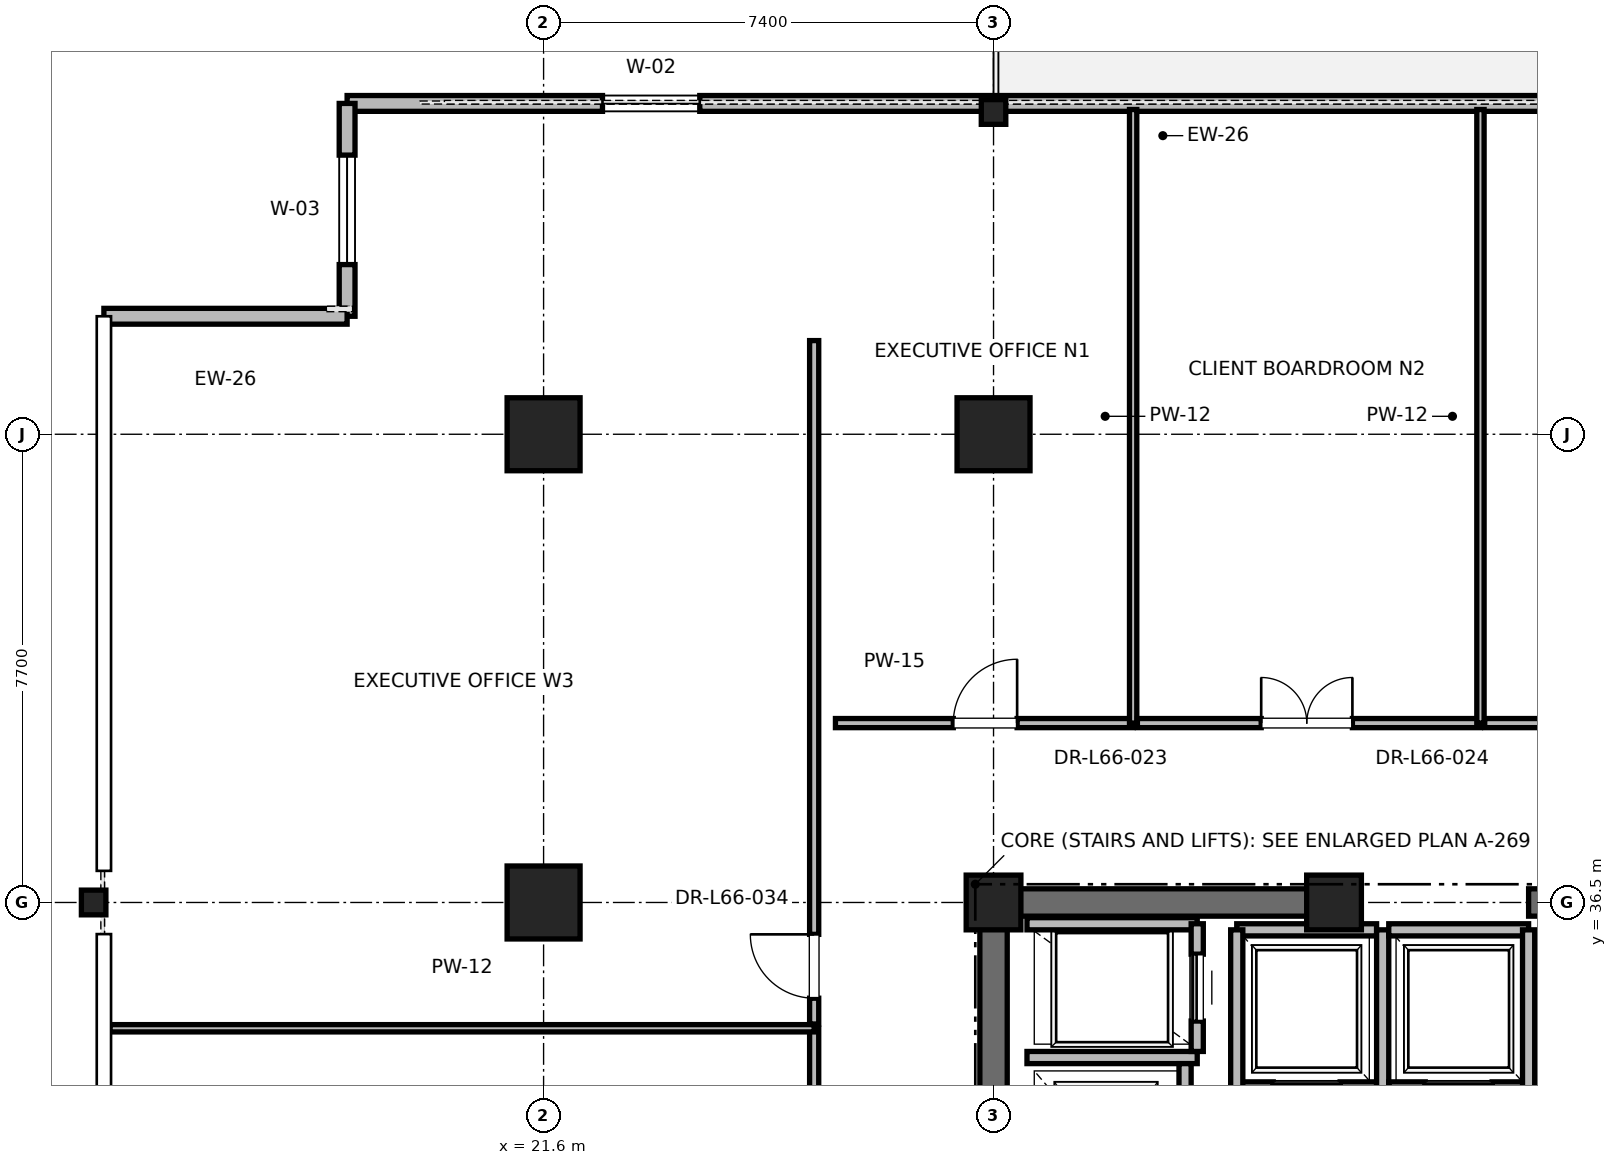
"""IFC4 building model, lengths in metres.
Left out: names, types, materials, properties, quantities, classifications, styles, units other than length and angle.
Written with IfcOpenShell. Run it as: python <this file> out.ifc"""

import sys

from ifc_helpers import new_model, si_unit, direction, frame, frame_2d, origin, origin_2d, place, context, subcontext, project, spatial, rectangle, i_section, extrude, element, fill, save


model = new_model("IFC4")
c1 = context("Model", 3, precision=1e-05, world=origin(), true_north=direction((0.0, 1.0)))
c2 = subcontext(c1, "Body", "Model", "MODEL_VIEW")
j1 = project(units=[si_unit("LENGTHUNIT", "METRE"), si_unit("PLANEANGLEUNIT", "RADIAN")], contexts=[c1])
p1 = place(None, origin())
s1 = spatial("IfcSite", under=j1, at=p1, CompositionType="ELEMENT")
p2 = place(p1, origin())
s2 = spatial("IfcBuilding", under=s1, at=p2, CompositionType="ELEMENT")
p3 = place(p2, frame((0.0, 0.0, 283.2)))
s3 = spatial("IfcBuildingStorey", under=s2, at=p3, CompositionType="ELEMENT", Elevation=283.2)
for number, where, z_axis, x_axis in (
    (1, (29.0, 44.2, 0.0), (0.0, 0.0, 1.0), (1.0, 0.0, 0.0)),
    (2, (21.6, 36.5, 0.0), (0.0, 0.0, 1.0), (1.0, 0.0, 0.0)),
    (3, (21.6, 44.2, 0.0), (0.0, 0.0, 1.0), (1.0, 0.0, 0.0)),
):
    element("IfcColumn", number, at=place(p3, frame(where, z_axis=z_axis, x_axis=x_axis)), inside=s3, PredefinedType="COLUMN", context=c2, shape_type="SweptSolid", body=[
        extrude(rectangle(XDim=1.2, YDim=1.2, at=origin_2d()), origin(), (0.0, 0.0, 1.0), 4.0),
    ])
for number, where, z_axis, x_axis in (
    (4, (14.2, 36.5, 0.0), (0.0, 0.0, 1.0), (1.0, 0.0, 0.0)),
    (5, (29.0, 49.5, 0.0), (0.0, 0.0, 1.0), (1.0, 0.0, 0.0)),
):
    element("IfcColumn", number, at=place(p3, frame(where, z_axis=z_axis, x_axis=x_axis)), inside=s3, PredefinedType="COLUMN", context=c2, shape_type="SweptSolid", body=[
        extrude(i_section(OverallWidth=0.403, OverallDepth=0.406, WebThickness=0.027, FlangeThickness=0.043, FilletRadius=0.015, at=origin_2d()), origin(), (0.0, 0.0, 1.0), 4.0),
    ])
for number, where, z_axis, x_axis in (
    (6, (29.0, 36.5, 0.0), (0.0, 0.0, 1.0), (1.0, 0.0, 0.0)),
    (7, (34.6, 36.5, 0.0), (0.0, 0.0, 1.0), (1.0, 0.0, 0.0)),
):
    element("IfcColumn", number, at=place(p3, frame(where, z_axis=z_axis, x_axis=x_axis)), inside=s3, PredefinedType="PILASTER", context=c2, shape_type="SweptSolid", body=[
        extrude(rectangle(XDim=0.9, YDim=0.9, at=origin_2d()), origin(), (0.0, 0.0, 1.0), 4.0),
    ])
p4 = place(p3, frame((29.0, 36.5, 0.0), z_axis=(0.0, 0.0, 1.0), x_axis=(1.0, 0.0, 0.0)))
e8 = element("IfcWall", 8, at=p4, inside=s3, PredefinedType="SHEAR", context=c2, shape_type="SweptSolid", body=[
    extrude(rectangle(XDim=5.8, YDim=0.45, at=frame_2d((2.9, 0.0))), origin(), (0.0, 0.0, 1.0), 3.785),
])
p5 = place(p3, frame((37.8, 36.5, 0.0), z_axis=(0.0, 0.0, 1.0), x_axis=(1.0, 0.0, 0.0)))
e9 = element("IfcWall", 9, at=p5, inside=s3, PredefinedType="SHEAR", context=c2, shape_type="SweptSolid", body=[
    extrude(rectangle(XDim=4.4, YDim=0.45, at=frame_2d((2.2, 0.0))), origin(), (0.0, 0.0, 1.0), 3.785),
])
p6 = place(p5, frame((1.65, 0.0, 0.0)))
e10 = element("IfcOpeningElement", 10, at=p6, cuts=e9, PredefinedType="OPENING", context=c2, shape_type="SweptSolid", body=[
    extrude(rectangle(XDim=1.1, YDim=2.15, at=frame_2d((0.55, 1.075))), frame((0.0, 0.225, 0.0), z_axis=(0.0, -1.0, 0.0), x_axis=(1.0, 0.0, 0.0)), (0.0, 0.0, 1.0), 0.45),
])
p7 = place(p3, frame((29.0, 30.7, 0.0), z_axis=(0.0, 0.0, 1.0), x_axis=(0.0, 1.0, 0.0)))
e11 = element("IfcWall", 11, at=p7, inside=s3, PredefinedType="SHEAR", context=c2, shape_type="SweptSolid", body=[
    extrude(rectangle(XDim=5.8, YDim=0.45, at=frame_2d((2.9, 0.0))), origin(), (0.0, 0.0, 1.0), 3.785),
])
p8 = place(p3, frame((61.631, 49.64, 0.0), z_axis=(0.0, 0.0, 1.0), x_axis=(-1.0, 0.0, 0.0)))
e12 = element("IfcWall", 12, at=p8, inside=s3, PredefinedType="PARAPET", context=c2, shape_type="SweptSolid", body=[
    extrude(rectangle(XDim=43.263, YDim=0.26, at=frame_2d((21.631, 0.0))), origin(), (0.0, 0.0, 1.0), 3.123),
])
p9 = place(p8, frame((4.2, 0.0, 0.85)))
e13 = element("IfcOpeningElement", 13, at=p9, cuts=e12, PredefinedType="OPENING", context=c2, shape_type="SweptSolid", body=[
    extrude(rectangle(XDim=1.6, YDim=2.1, at=frame_2d((0.8, 1.05))), frame((0.0, 0.13, 0.0), z_axis=(0.0, -1.0, 0.0), x_axis=(1.0, 0.0, 0.0)), (0.0, 0.0, 1.0), 0.26),
])
p10 = place(p8, frame((21.031, 0.0, 0.0)))
e14 = element("IfcOpeningElement", 14, at=p10, cuts=e12, PredefinedType="OPENING", context=c2, shape_type="SweptSolid", body=[
    extrude(rectangle(XDim=1.2, YDim=2.2, at=frame_2d((0.6, 1.1))), frame((0.0, 0.13, 0.0), z_axis=(0.0, -1.0, 0.0), x_axis=(1.0, 0.0, 0.0)), (0.0, 0.0, 1.0), 0.26),
])
p11 = place(p8, frame((37.463, 0.0, 0.85)))
e15 = element("IfcOpeningElement", 15, at=p11, cuts=e12, PredefinedType="OPENING", context=c2, shape_type="SweptSolid", body=[
    extrude(rectangle(XDim=1.6, YDim=2.1, at=frame_2d((0.8, 1.05))), frame((0.0, 0.13, 0.0), z_axis=(0.0, -1.0, 0.0), x_axis=(1.0, 0.0, 0.0)), (0.0, 0.0, 1.0), 0.26),
])
p12 = place(p3, frame((18.369, 49.64, 0.0), z_axis=(0.0, 0.0, 1.0), x_axis=(0.0, -1.0, 0.0)))
e16 = element("IfcWall", 16, at=p12, inside=s3, PredefinedType="PARAPET", context=c2, shape_type="SweptSolid", body=[
    extrude(rectangle(XDim=3.5, YDim=0.26, at=frame_2d((1.75, 0.0))), origin(), (0.0, 0.0, 1.0), 3.785),
])
p13 = place(p12, frame((0.85, 0.0, 0.85)))
e17 = element("IfcOpeningElement", 17, at=p13, cuts=e16, PredefinedType="OPENING", context=c2, shape_type="SweptSolid", body=[
    extrude(rectangle(XDim=1.8, YDim=2.2, at=frame_2d((0.9, 1.1))), frame((0.0, 0.13, 0.0), z_axis=(0.0, -1.0, 0.0), x_axis=(1.0, 0.0, 0.0)), (0.0, 0.0, 1.0), 0.26),
])
p14 = place(p3, frame((18.369, 46.14, 0.0), z_axis=(0.0, 0.0, 1.0), x_axis=(-1.0, 0.0, 0.0)))
e18 = element("IfcWall", 18, at=p14, inside=s3, PredefinedType="PARAPET", context=c2, shape_type="SweptSolid", body=[
    extrude(rectangle(XDim=4.0, YDim=0.26, at=frame_2d((2.0, 0.0))), origin(), (0.0, 0.0, 1.0), 3.785),
])
p15 = place(p3, frame((29.55, 33.95, 0.0), z_axis=(0.0, 0.0, 1.0), x_axis=(1.0, 0.0, 0.0)))
e19 = element("IfcWall", 19, at=p15, inside=s3, PredefinedType="SOLIDWALL", context=c2, shape_type="SweptSolid", body=[
    extrude(rectangle(XDim=2.8, YDim=0.2, at=frame_2d((1.4, 0.0))), origin(), (0.0, 0.0, 1.0), 3.785),
])
p16 = place(p3, frame((32.15, 30.85, 0.0), z_axis=(0.0, 0.0, 1.0), x_axis=(0.0, 1.0, 0.0)))
e20 = element("IfcWall", 20, at=p16, inside=s3, PredefinedType="SOLIDWALL", context=c2, shape_type="SweptSolid", body=[
    extrude(rectangle(XDim=3.0, YDim=0.2, at=frame_2d((1.5, 0.0))), origin(), (0.0, 0.0, 1.0), 3.785),
])
p17 = place(p3, frame((32.35, 36.15, 0.0), z_axis=(0.0, 0.0, 1.0), x_axis=(-1.0, 0.0, 0.0)))
e21 = element("IfcWall", 21, at=p17, inside=s3, PredefinedType="SOLIDWALL", context=c2, shape_type="SweptSolid", body=[
    extrude(rectangle(XDim=2.8, YDim=0.2, at=frame_2d((1.4, 0.0))), origin(), (0.0, 0.0, 1.0), 3.148),
])
p18 = place(p3, frame((32.35, 34.05, 0.0), z_axis=(0.0, 0.0, 1.0), x_axis=(0.0, 1.0, 0.0)))
e22 = element("IfcWall", 22, at=p18, inside=s3, PredefinedType="SOLIDWALL", context=c2, shape_type="SweptSolid", body=[
    extrude(rectangle(XDim=2.1, YDim=0.2, at=frame_2d((1.05, 0.0))), origin(), (0.0, 0.0, 1.0), 3.785),
])
p19 = place(p18, frame((0.5, 0.0, 0.0)))
e23 = element("IfcOpeningElement", 23, at=p19, cuts=e22, PredefinedType="OPENING", context=c2, shape_type="SweptSolid", body=[
    extrude(rectangle(XDim=1.1, YDim=2.2, at=frame_2d((0.55, 1.1))), frame((0.0, 0.1, 0.0), z_axis=(0.0, -1.0, 0.0), x_axis=(1.0, 0.0, 0.0)), (0.0, 0.0, 1.0), 0.2),
])
p20 = place(p3, frame((33.0, 33.45, 0.0), z_axis=(0.0, 0.0, 1.0), x_axis=(1.0, 0.0, 0.0)))
e24 = element("IfcWall", 24, at=p20, inside=s3, PredefinedType="SOLIDWALL", context=c2, shape_type="SweptSolid", body=[
    extrude(rectangle(XDim=2.3, YDim=0.2, at=frame_2d((1.15, 0.0))), origin(), (0.0, 0.0, 1.0), 3.785),
])
p21 = place(p20, frame((0.6, 0.0, 0.0)))
e25 = element("IfcOpeningElement", 25, at=p21, cuts=e24, PredefinedType="OPENING", context=c2, shape_type="SweptSolid", body=[
    extrude(rectangle(XDim=1.1, YDim=2.2, at=frame_2d((0.55, 1.1))), frame((0.0, 0.1, 0.0), z_axis=(0.0, -1.0, 0.0), x_axis=(1.0, 0.0, 0.0)), (0.0, 0.0, 1.0), 0.2),
])
p22 = place(p3, frame((35.3, 36.05, 0.0), z_axis=(0.0, 0.0, 1.0), x_axis=(-1.0, 0.0, 0.0)))
e26 = element("IfcWall", 26, at=p22, inside=s3, PredefinedType="SOLIDWALL", context=c2, shape_type="SweptSolid", body=[
    extrude(rectangle(XDim=2.3, YDim=0.2, at=frame_2d((1.15, 0.0))), origin(), (0.0, 0.0, 1.0), 2.865),
])
p23 = place(p3, frame((33.0, 36.05, 0.0), z_axis=(0.0, 0.0, 1.0), x_axis=(0.0, -1.0, 0.0)))
e27 = element("IfcWall", 27, at=p23, inside=s3, PredefinedType="SOLIDWALL", context=c2, shape_type="SweptSolid", body=[
    extrude(rectangle(XDim=2.6, YDim=0.2, at=frame_2d((1.3, 0.0))), origin(), (0.0, 0.0, 1.0), 3.785),
])
p24 = place(p3, frame((35.4, 33.45, 0.0), z_axis=(0.0, 0.0, 1.0), x_axis=(0.0, 1.0, 0.0)))
e28 = element("IfcWall", 28, at=p24, inside=s3, PredefinedType="SOLIDWALL", context=c2, shape_type="SweptSolid", body=[
    extrude(rectangle(XDim=2.6, YDim=0.2, at=frame_2d((1.3, 0.0))), origin(), (0.0, 0.0, 1.0), 2.865),
])
p25 = place(p3, frame((35.5, 33.45, 0.0), z_axis=(0.0, 0.0, 1.0), x_axis=(1.0, 0.0, 0.0)))
e29 = element("IfcWall", 29, at=p25, inside=s3, PredefinedType="SOLIDWALL", context=c2, shape_type="SweptSolid", body=[
    extrude(rectangle(XDim=2.3, YDim=0.2, at=frame_2d((1.15, 0.0))), origin(), (0.0, 0.0, 1.0), 3.785),
])
p26 = place(p25, frame((0.6, 0.0, 0.0)))
e30 = element("IfcOpeningElement", 30, at=p26, cuts=e29, PredefinedType="OPENING", context=c2, shape_type="SweptSolid", body=[
    extrude(rectangle(XDim=1.1, YDim=2.2, at=frame_2d((0.55, 1.1))), frame((0.0, 0.1, 0.0), z_axis=(0.0, -1.0, 0.0), x_axis=(1.0, 0.0, 0.0)), (0.0, 0.0, 1.0), 0.2),
])
p27 = place(p3, frame((37.8, 36.05, 0.0), z_axis=(0.0, 0.0, 1.0), x_axis=(-1.0, 0.0, 0.0)))
e31 = element("IfcWall", 31, at=p27, inside=s3, PredefinedType="SOLIDWALL", context=c2, shape_type="SweptSolid", body=[
    extrude(rectangle(XDim=2.3, YDim=0.2, at=frame_2d((1.15, 0.0))), origin(), (0.0, 0.0, 1.0), 2.865),
])
p28 = place(p3, frame((37.8, 33.45, 0.0), z_axis=(0.0, 0.0, 1.0), x_axis=(0.0, 1.0, 0.0)))
e32 = element("IfcWall", 32, at=p28, inside=s3, PredefinedType="SOLIDWALL", context=c2, shape_type="SweptSolid", body=[
    extrude(rectangle(XDim=2.6, YDim=0.2, at=frame_2d((1.3, 0.0))), origin(), (0.0, 0.0, 1.0), 2.865),
])
p29 = place(p3, frame((26.4, 39.45, 0.0), z_axis=(0.0, 0.0, 1.0), x_axis=(1.0, 0.0, 0.0)))
e33 = element("IfcWall", 33, at=p29, inside=s3, PredefinedType="PARTITIONING", context=c2, shape_type="SweptSolid", body=[
    extrude(rectangle(XDim=4.896, YDim=0.15, at=frame_2d((2.448, 0.0))), origin(), (0.0, 0.0, 1.0), 2.85),
])
p30 = place(p29, frame((1.938, 0.0, 0.0)))
e34 = element("IfcOpeningElement", 34, at=p30, cuts=e33, PredefinedType="OPENING", context=c2, shape_type="SweptSolid", body=[
    extrude(rectangle(XDim=1.05, YDim=2.2, at=frame_2d((0.525, 1.1))), frame((0.0, 0.075, 0.0), z_axis=(0.0, -1.0, 0.0), x_axis=(1.0, 0.0, 0.0)), (0.0, 0.0, 1.0), 0.15),
])
p31 = place(p3, frame((31.296, 39.45, 0.0), z_axis=(0.0, 0.0, 1.0), x_axis=(0.0, 1.0, 0.0)))
e35 = element("IfcWall", 35, at=p31, inside=s3, PredefinedType="PARTITIONING", context=c2, shape_type="SweptSolid", body=[
    extrude(rectangle(XDim=10.09, YDim=0.12, at=frame_2d((5.045, 0.0))), origin(), (0.0, 0.0, 1.0), 2.415),
])
p32 = place(p3, frame((31.366, 39.45, 0.0), z_axis=(0.0, 0.0, 1.0), x_axis=(1.0, 0.0, 0.0)))
e36 = element("IfcWall", 36, at=p32, inside=s3, PredefinedType="PARTITIONING", context=c2, shape_type="SweptSolid", body=[
    extrude(rectangle(XDim=5.642, YDim=0.15, at=frame_2d((2.821, 0.0))), origin(), (0.0, 0.0, 1.0), 2.85),
])
p33 = place(p32, frame((2.036, 0.0, 0.0)))
e37 = element("IfcOpeningElement", 37, at=p33, cuts=e36, PredefinedType="OPENING", context=c2, shape_type="SweptSolid", body=[
    extrude(rectangle(XDim=1.5, YDim=2.25, at=frame_2d((0.75, 1.125))), frame((0.0, 0.075, 0.0), z_axis=(0.0, -1.0, 0.0), x_axis=(1.0, 0.0, 0.0)), (0.0, 0.0, 1.0), 0.15),
])
p34 = place(p3, frame((37.008, 39.45, 0.0), z_axis=(0.0, 0.0, 1.0), x_axis=(0.0, 1.0, 0.0)))
e38 = element("IfcWall", 38, at=p34, inside=s3, PredefinedType="PARTITIONING", context=c2, shape_type="SweptSolid", body=[
    extrude(rectangle(XDim=10.09, YDim=0.12, at=frame_2d((5.045, 0.0))), origin(), (0.0, 0.0, 1.0), 2.415),
])
p35 = place(p3, frame((37.078, 39.45, 0.0), z_axis=(0.0, 0.0, 1.0), x_axis=(1.0, 0.0, 0.0)))
e39 = element("IfcWall", 39, at=p35, inside=s3, PredefinedType="PARTITIONING", context=c2, shape_type="SweptSolid", body=[
    extrude(rectangle(XDim=6.186, YDim=0.15, at=frame_2d((3.093, 0.0))), origin(), (0.0, 0.0, 1.0), 2.85),
])
p36 = place(p35, frame((2.558, 0.0, 0.0)))
e40 = element("IfcOpeningElement", 40, at=p36, cuts=e39, PredefinedType="OPENING", context=c2, shape_type="SweptSolid", body=[
    extrude(rectangle(XDim=1.0, YDim=2.15, at=frame_2d((0.5, 1.075))), frame((0.0, 0.075, 0.0), z_axis=(0.0, -1.0, 0.0), x_axis=(1.0, 0.0, 0.0)), (0.0, 0.0, 1.0), 0.15),
])
p37 = place(p3, frame((26.05, 22.098, 0.0), z_axis=(0.0, 0.0, 1.0), x_axis=(0.0, 1.0, 0.0)))
e41 = element("IfcWall", 41, at=p37, inside=s3, PredefinedType="PARTITIONING", context=c2, shape_type="SweptSolid", body=[
    extrude(rectangle(XDim=12.333, YDim=0.15, at=frame_2d((6.167, 0.0))), origin(), (0.0, 0.0, 1.0), 2.85),
])
p38 = place(p37, frame((5.632, 0.0, 0.0)))
e42 = element("IfcOpeningElement", 42, at=p38, cuts=e41, PredefinedType="OPENING", context=c2, shape_type="SweptSolid", body=[
    extrude(rectangle(XDim=1.0, YDim=2.15, at=frame_2d((0.5, 1.075))), frame((0.0, 0.075, 0.0), z_axis=(0.0, -1.0, 0.0), x_axis=(1.0, 0.0, 0.0)), (0.0, 0.0, 1.0), 0.15),
])
p39 = place(p3, frame((14.469, 34.431, 0.0), z_axis=(0.0, 0.0, 1.0), x_axis=(1.0, 0.0, 0.0)))
e43 = element("IfcWall", 43, at=p39, inside=s3, PredefinedType="PARTITIONING", context=c2, shape_type="SweptSolid", body=[
    extrude(rectangle(XDim=11.581, YDim=0.12, at=frame_2d((5.791, 0.0))), origin(), (0.0, 0.0, 1.0), 2.85),
])
p40 = place(p3, frame((26.05, 34.501, 0.0), z_axis=(0.0, 0.0, 1.0), x_axis=(0.0, 1.0, 0.0)))
e44 = element("IfcWall", 44, at=p40, inside=s3, PredefinedType="PARTITIONING", context=c2, shape_type="SweptSolid", body=[
    extrude(rectangle(XDim=11.239, YDim=0.15, at=frame_2d((5.62, 0.0))), origin(), (0.0, 0.0, 1.0), 2.85),
])
p41 = place(p40, frame((0.424, 0.0, 0.0)))
e45 = element("IfcOpeningElement", 45, at=p41, cuts=e44, PredefinedType="OPENING", context=c2, shape_type="SweptSolid", body=[
    extrude(rectangle(XDim=1.05, YDim=2.2, at=frame_2d((0.525, 1.1))), frame((0.0, 0.075, 0.0), z_axis=(0.0, -1.0, 0.0), x_axis=(1.0, 0.0, 0.0)), (0.0, 0.0, 1.0), 0.15),
])
p42 = place(p11, origin())
e46 = element("IfcWindow", 46, at=p42, inside=s3, PartitioningType="SINGLE_PANEL", PredefinedType="WINDOW", context=c2, shape_type="SweptSolid", body=[
    extrude(rectangle(XDim=1.6, YDim=2.1, at=frame_2d((0.8, 1.05))), frame((0.0, 0.03, 0.0), z_axis=(0.0, -1.0, 0.0), x_axis=(1.0, 0.0, 0.0)), (0.0, 0.0, 1.0), 0.06),
])
fill(e15, e46)
p43 = place(p13, origin())
e47 = element("IfcWindow", 47, at=p43, inside=s3, PartitioningType="SINGLE_PANEL", PredefinedType="WINDOW", context=c2, shape_type="SweptSolid", body=[
    extrude(rectangle(XDim=1.8, YDim=2.2, at=frame_2d((0.9, 1.1))), frame((0.0, 0.03, 0.0), z_axis=(0.0, -1.0, 0.0), x_axis=(1.0, 0.0, 0.0)), (0.0, 0.0, 1.0), 0.06),
])
fill(e17, e47)
p44 = place(p19, origin())
e48 = element("IfcDoor", 48, at=p44, inside=s3, OperationType="SLIDING_TO_RIGHT", PredefinedType="DOOR", context=c2, shape_type="SweptSolid", body=[
    extrude(rectangle(XDim=1.1, YDim=2.2, at=frame_2d((0.55, 1.1))), frame((0.0, 0.025, 0.0), z_axis=(0.0, -1.0, 0.0), x_axis=(1.0, 0.0, 0.0)), (0.0, 0.0, 1.0), 0.05),
])
fill(e23, e48)
p45 = place(p30, origin())
e49 = element("IfcDoor", 49, at=p45, inside=s3, OperationType="SINGLE_SWING_RIGHT", PredefinedType="DOOR", context=c2, shape_type="SweptSolid", body=[
    extrude(rectangle(XDim=1.05, YDim=2.2, at=frame_2d((0.525, 1.1))), frame((0.0, 0.025, 0.0), z_axis=(0.0, -1.0, 0.0), x_axis=(1.0, 0.0, 0.0)), (0.0, 0.0, 1.0), 0.05),
])
fill(e34, e49)
p46 = place(p33, origin())
e50 = element("IfcDoor", 50, at=p46, inside=s3, OperationType="DOUBLE_DOOR_SINGLE_SWING", PredefinedType="DOOR", context=c2, shape_type="SweptSolid", body=[
    extrude(rectangle(XDim=1.5, YDim=2.25, at=frame_2d((0.75, 1.125))), frame((0.0, 0.025, 0.0), z_axis=(0.0, -1.0, 0.0), x_axis=(1.0, 0.0, 0.0)), (0.0, 0.0, 1.0), 0.05),
])
fill(e37, e50)
p47 = place(p41, origin())
e51 = element("IfcDoor", 51, at=p47, inside=s3, OperationType="SINGLE_SWING_RIGHT", PredefinedType="DOOR", context=c2, shape_type="SweptSolid", body=[
    extrude(rectangle(XDim=1.05, YDim=2.2, at=frame_2d((0.525, 1.1))), frame((0.0, 0.025, 0.0), z_axis=(0.0, -1.0, 0.0), x_axis=(1.0, 0.0, 0.0)), (0.0, 0.0, 1.0), 0.05),
])
fill(e45, e51)
save(model, sys.argv[1])
